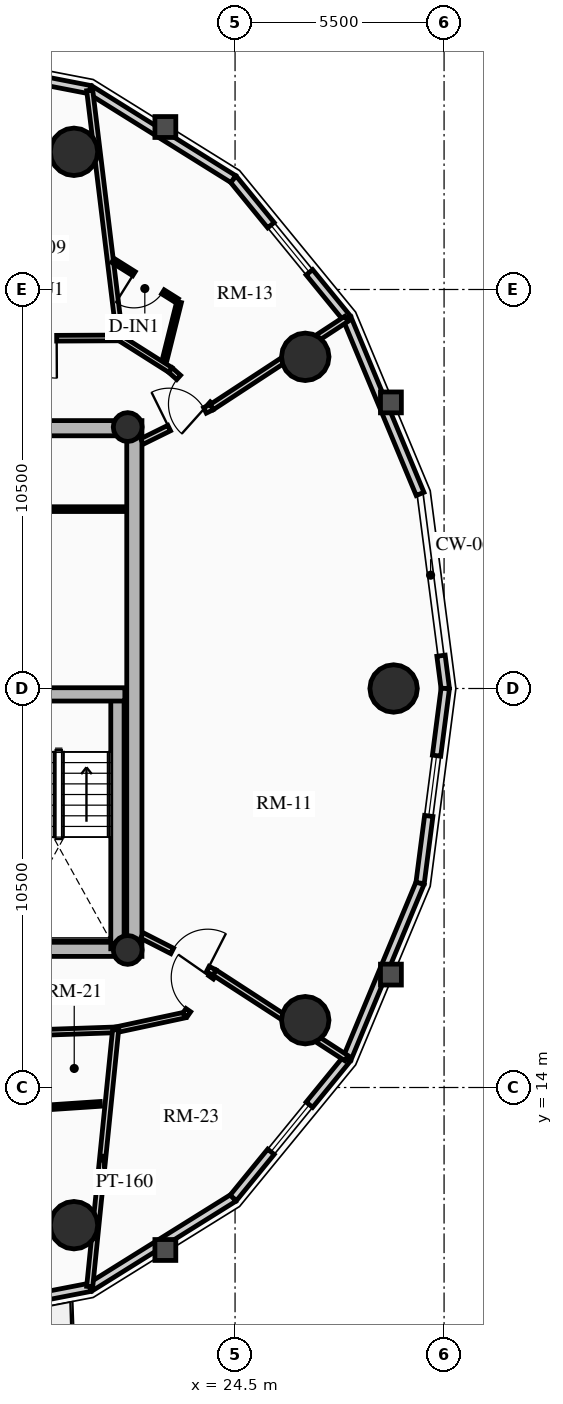
"""IFC4 building model, lengths in metres.
Left out: names, types, materials, properties, quantities, classifications, styles, units other than length and angle.
Written with IfcOpenShell. Run it as: python <this file> out.ifc"""

import sys

from ifc_helpers import new_model, si_unit, direction, frame, frame_2d, origin, origin_2d, place, context, subcontext, project, spatial, rectangle, circle, hollow_circle, extrude, source, transform, mapped, element, fill, save


model = new_model("IFC4")
c1 = context("Model", 3, precision=1e-05, world=origin(), true_north=direction((0.0, 1.0)))
c2 = subcontext(c1, "Body", "Model", "MODEL_VIEW")
j1 = project(units=[si_unit("LENGTHUNIT", "METRE"), si_unit("PLANEANGLEUNIT", "RADIAN")], contexts=[c1])
p1 = place(None, origin())
s1 = spatial("IfcSite", under=j1, at=p1, CompositionType="ELEMENT")
p2 = place(p1, origin())
s2 = spatial("IfcBuilding", under=s1, at=p2, CompositionType="ELEMENT")
p3 = place(p2, frame((0.0, 0.0, 180.7)))
s3 = spatial("IfcBuildingStorey", under=s2, at=p3, CompositionType="ELEMENT", Elevation=180.7)
p4 = place(p3, frame((21.85, 17.45, 0.0), z_axis=(0.0, 0.0, 1.0), x_axis=(0.0, 1.0, 0.0)))
e1 = element("IfcWall", 1, at=p4, inside=s3, PredefinedType="SHEAR", context=c2, shape_type="SweptSolid", body=[
    extrude(rectangle(XDim=14.1, YDim=0.4, at=frame_2d((7.05, 0.0))), origin(), (0.0, 0.0, 1.0), 2.91),
])
p5 = place(p3, frame((11.15, 17.65, 0.0), z_axis=(0.0, 0.0, 1.0), x_axis=(1.0, 0.0, 0.0)))
e2 = element("IfcWall", 2, at=p5, inside=s3, PredefinedType="SHEAR", context=c2, shape_type="SweptSolid", body=[
    extrude(rectangle(XDim=10.7, YDim=0.4, at=frame_2d((5.35, 0.0))), origin(), (0.0, 0.0, 1.0), 2.91),
])
m1 = source(origin(), c2, "Body", "SweptSolid", [
    extrude(rectangle(XDim=1.5, YDim=2.02, at=frame_2d((0.75, 1.01))), frame((0.0, 0.21, 0.0), z_axis=(0.0, -1.0, 0.0), x_axis=(1.0, 0.0, 0.0)), (0.0, 0.0, 1.0), 0.42),
])
p6 = place(p5, frame((5.45, 0.0, 0.0)))
e3 = element("IfcOpeningElement", 3, at=p6, cuts=e2, PredefinedType="OPENING", context=c2, shape_type="MappedRepresentation", body=[
    mapped(m1, transform((0.0, 0.0, 0.0), x_axis=(1.0, 0.0, 0.0), y_axis=(0.0, 1.0, 0.0), z_axis=(0.0, 0.0, 1.0), scale=1.0)),
])
p7 = place(p3, frame((11.15, 31.35, 0.0), z_axis=(0.0, 0.0, 1.0), x_axis=(1.0, 0.0, 0.0)))
e4 = element("IfcWall", 4, at=p7, inside=s3, PredefinedType="SHEAR", context=c2, shape_type="SweptSolid", body=[
    extrude(rectangle(XDim=10.7, YDim=0.4, at=frame_2d((5.35, 0.0))), origin(), (0.0, 0.0, 1.0), 2.91),
])
p8 = place(p7, frame((4.6, 0.0, 0.0)))
e5 = element("IfcOpeningElement", 5, at=p8, cuts=e4, PredefinedType="OPENING", context=c2, shape_type="MappedRepresentation", body=[
    mapped(m1, transform((0.0, 0.0, 0.0), x_axis=(1.0, 0.0, 0.0), y_axis=(0.0, 1.0, 0.0), z_axis=(0.0, 0.0, 1.0), scale=1.0)),
])
p9 = place(p3, frame((21.405, 17.65, 0.0), z_axis=(0.0, 0.0, 1.0), x_axis=(0.0, 1.0, 0.0)))
e6 = element("IfcWall", 6, at=p9, inside=s3, PredefinedType="SHEAR", context=c2, shape_type="SweptSolid", body=[
    extrude(rectangle(XDim=6.695, YDim=0.35, at=frame_2d((3.348, 0.0))), origin(), (0.0, 0.0, 1.0), 2.91),
])
p10 = place(p3, frame((18.315, 24.345, 0.0), z_axis=(0.0, 0.0, 1.0), x_axis=(1.0, 0.0, 0.0)))
e7 = element("IfcWall", 7, at=p10, inside=s3, PredefinedType="SHEAR", context=c2, shape_type="SweptSolid", body=[
    extrude(rectangle(XDim=3.285, YDim=0.35, at=frame_2d((1.643, 0.0))), origin(), (0.0, 0.0, 1.0), 2.91),
])
for number, where, z_axis, x_axis in (
    (8, (21.675, 17.62, 0.0), (0.0, 0.0, 1.0), (1.0, 0.0, 0.0)),
    (9, (21.675, 31.38, 0.0), (0.0, 0.0, 1.0), (1.0, 0.0, 0.0)),
):
    element("IfcColumn", number, at=place(p3, frame(where, z_axis=z_axis, x_axis=x_axis)), inside=s3, PredefinedType="COLUMN", context=c2, shape_type="SweptSolid", body=[
        extrude(hollow_circle(Radius=0.38, WallThickness=0.032, at=origin_2d()), origin(), (0.0, 0.0, 1.0), 2.91),
    ])
for number, where, z_axis, x_axis in (
    (10, (28.672, 24.5, 0.0), (0.0, 0.0, 1.0), (1.0, 0.0, 0.0)),
    (11, (26.347, 33.229, 0.0), (0.0, 0.0, 1.0), (1.0, 0.0, 0.0)),
    (12, (20.261, 38.623, 0.0), (0.0, 0.0, 1.0), (1.0, 0.0, 0.0)),
    (13, (20.261, 10.377, 0.0), (0.0, 0.0, 1.0), (1.0, 0.0, 0.0)),
    (14, (26.347, 15.771, 0.0), (0.0, 0.0, 1.0), (1.0, 0.0, 0.0)),
):
    element("IfcColumn", number, at=place(p3, frame(where, z_axis=z_axis, x_axis=x_axis)), inside=s3, PredefinedType="USERDEFINED", context=c2, shape_type="SweptSolid", body=[
        extrude(circle(Radius=0.625, at=origin_2d()), origin(), (0.0, 0.0, 1.0), 2.91),
    ])
p11 = place(p3, frame((29.919, 25.363, 0.0), z_axis=(0.0, 0.0, 1.0), x_axis=(0.128247365719, -0.991742211054, 0.0)))
e15 = element("IfcWall", 15, at=p11, inside=s3, PredefinedType="SOLIDWALL", context=c2, shape_type="SweptSolid", body=[
    extrude(rectangle(XDim=0.87, YDim=0.22, at=frame_2d((0.435, 0.0))), origin(), (0.0, 0.0, 1.0), 2.675),
])
p12 = place(p3, frame((27.447, 34.24, 0.0), z_axis=(0.0, 0.0, 1.0), x_axis=(0.384144094086, -0.923273152961, 0.0)))
e16 = element("IfcWall", 16, at=p12, inside=s3, PredefinedType="SOLIDWALL", context=c2, shape_type="SweptSolid", body=[
    extrude(rectangle(XDim=5.003, YDim=0.22, at=frame_2d((2.501, 0.0))), origin(), (0.0, 0.0, 1.0), 2.245),
])
p13 = place(p3, frame((24.453, 37.906, 0.0), z_axis=(0.0, 0.0, 1.0), x_axis=(0.632470615287, -0.774584353572, 0.0)))
e17 = element("IfcWall", 17, at=p13, inside=s3, PredefinedType="SOLIDWALL", context=c2, shape_type="SweptSolid", body=[
    extrude(rectangle(XDim=4.733, YDim=0.22, at=frame_2d((2.366, 0.0))), origin(), (0.0, 0.0, 1.0), 2.245),
])
m2 = source(origin(), c2, "Body", "SweptSolid", [
    extrude(rectangle(XDim=1.6, YDim=1.3, at=frame_2d((0.8, 0.65))), frame((0.0, 0.12, 0.0), z_axis=(0.0, -1.0, 0.0), x_axis=(1.0, 0.0, 0.0)), (0.0, 0.0, 1.0), 0.24),
])
p14 = place(p13, frame((1.566, 0.0, 0.65)))
e18 = element("IfcOpeningElement", 18, at=p14, cuts=e17, PredefinedType="OPENING", context=c2, shape_type="MappedRepresentation", body=[
    mapped(m2, transform((0.0, 0.0, 0.0), x_axis=(1.0, 0.0, 0.0), y_axis=(0.0, 1.0, 0.0), z_axis=(0.0, 0.0, 1.0), scale=1.0)),
])
p15 = place(p3, frame((20.681, 40.259, 0.0), z_axis=(0.0, 0.0, 1.0), x_axis=(0.848399108042, -0.529357113368, 0.0)))
e19 = element("IfcWall", 19, at=p15, inside=s3, PredefinedType="SOLIDWALL", context=c2, shape_type="SweptSolid", body=[
    extrude(rectangle(XDim=4.446, YDim=0.22, at=frame_2d((2.223, 0.0))), origin(), (0.0, 0.0, 1.0), 2.245),
])
p16 = place(p3, frame((16.5, 41.07, 0.0), z_axis=(0.0, 0.0, 1.0), x_axis=(0.981703883443, -0.190413983815, 0.0)))
e20 = element("IfcWall", 20, at=p16, inside=s3, PredefinedType="SOLIDWALL", context=c2, shape_type="SweptSolid", body=[
    extrude(rectangle(XDim=4.259, YDim=0.22, at=frame_2d((2.13, 0.0))), origin(), (0.0, 0.0, 1.0), 2.245),
])
p17 = place(p16, frame((1.33, 0.0, 0.65)))
e21 = element("IfcOpeningElement", 21, at=p17, cuts=e20, PredefinedType="OPENING", context=c2, shape_type="MappedRepresentation", body=[
    mapped(m2, transform((0.0, 0.0, 0.0), x_axis=(1.0, 0.0, 0.0), y_axis=(0.0, 1.0, 0.0), z_axis=(0.0, 0.0, 1.0), scale=1.0)),
])
p18 = place(p3, frame((20.681, 8.741, 0.0), z_axis=(0.0, 0.0, 1.0), x_axis=(-0.981703883443, -0.190413983815, 0.0)))
e22 = element("IfcWall", 22, at=p18, inside=s3, PredefinedType="SOLIDWALL", context=c2, shape_type="SweptSolid", body=[
    extrude(rectangle(XDim=4.259, YDim=0.22, at=frame_2d((2.13, 0.0))), origin(), (0.0, 0.0, 1.0), 2.245),
])
m3 = source(origin(), c2, "Body", "SweptSolid", [
    extrude(rectangle(XDim=1.15, YDim=2.005, at=frame_2d((0.575, 1.002))), frame((0.0, 0.12, 0.0), z_axis=(0.0, -1.0, 0.0), x_axis=(1.0, 0.0, 0.0)), (0.0, 0.0, 1.0), 0.24),
])
p19 = place(p18, frame((1.555, 0.0, 0.0)))
e23 = element("IfcOpeningElement", 23, at=p19, cuts=e22, PredefinedType="OPENING", context=c2, shape_type="MappedRepresentation", body=[
    mapped(m3, transform((0.0, 0.0, 0.0), x_axis=(1.0, 0.0, 0.0), y_axis=(0.0, 1.0, 0.0), z_axis=(0.0, 0.0, 1.0), scale=1.0)),
])
p20 = place(p3, frame((24.453, 11.094, 0.0), z_axis=(0.0, 0.0, 1.0), x_axis=(-0.848399108042, -0.529357113368, 0.0)))
e24 = element("IfcWall", 24, at=p20, inside=s3, PredefinedType="SOLIDWALL", context=c2, shape_type="SweptSolid", body=[
    extrude(rectangle(XDim=4.446, YDim=0.22, at=frame_2d((2.223, 0.0))), origin(), (0.0, 0.0, 1.0), 2.245),
])
p21 = place(p3, frame((27.447, 14.76, 0.0), z_axis=(0.0, 0.0, 1.0), x_axis=(-0.632470615287, -0.774584353572, 0.0)))
e25 = element("IfcWall", 25, at=p21, inside=s3, PredefinedType="SOLIDWALL", context=c2, shape_type="SweptSolid", body=[
    extrude(rectangle(XDim=4.733, YDim=0.22, at=frame_2d((2.366, 0.0))), origin(), (0.0, 0.0, 1.0), 2.245),
])
p22 = place(p21, frame((1.566, 0.0, 0.65)))
e26 = element("IfcOpeningElement", 26, at=p22, cuts=e25, PredefinedType="OPENING", context=c2, shape_type="MappedRepresentation", body=[
    mapped(m2, transform((0.0, 0.0, 0.0), x_axis=(1.0, 0.0, 0.0), y_axis=(0.0, 1.0, 0.0), z_axis=(0.0, 0.0, 1.0), scale=1.0)),
])
p23 = place(p3, frame((29.369, 19.38, 0.0), z_axis=(0.0, 0.0, 1.0), x_axis=(-0.384144094086, -0.923273152961, 0.0)))
e27 = element("IfcWall", 27, at=p23, inside=s3, PredefinedType="SOLIDWALL", context=c2, shape_type="SweptSolid", body=[
    extrude(rectangle(XDim=5.003, YDim=0.22, at=frame_2d((2.501, 0.0))), origin(), (0.0, 0.0, 1.0), 2.245),
])
p24 = place(p3, frame((30.031, 24.5, 0.0), z_axis=(0.0, 0.0, 1.0), x_axis=(-0.128287912609, -0.991736966881, 0.0)))
e28 = element("IfcWall", 28, at=p24, inside=s3, PredefinedType="SOLIDWALL", context=c2, shape_type="SweptSolid", body=[
    extrude(rectangle(XDim=5.163, YDim=0.22, at=frame_2d((2.582, 0.0))), origin(), (0.0, 0.0, 1.0), 2.245),
])
p25 = place(p24, frame((1.782, 0.0, 0.65)))
e29 = element("IfcOpeningElement", 29, at=p25, cuts=e28, PredefinedType="OPENING", context=c2, shape_type="MappedRepresentation", body=[
    mapped(m2, transform((0.0, 0.0, 0.0), x_axis=(1.0, 0.0, 0.0), y_axis=(0.0, 1.0, 0.0), z_axis=(0.0, 0.0, 1.0), scale=1.0)),
])
p26 = place(p3, frame((18.38, 29.22, 0.0), z_axis=(0.0, 0.0, 1.0), x_axis=(1.0, 0.0, 0.0)))
e30 = element("IfcWall", 30, at=p26, inside=s3, PredefinedType="PARTITIONING", context=c2, shape_type="SweptSolid", body=[
    extrude(rectangle(XDim=3.22, YDim=0.125, at=frame_2d((1.61, 0.0))), origin(), (0.0, 0.0, 1.0), 2.212),
])
p27 = place(p3, frame((23.887, 31.906, 0.0), z_axis=(0.0, 0.0, 1.0), x_axis=(-0.744900957214, 0.66717506244, 0.0)))
e31 = element("IfcWall", 31, at=p27, inside=s3, PredefinedType="PARTITIONING", context=c2, shape_type="SweptSolid", body=[
    extrude(rectangle(XDim=1.464, YDim=0.15, at=frame_2d((0.732, 0.0))), origin(), (0.0, 0.0, 1.0), 2.245),
])
m4 = source(origin(), c2, "Body", "SweptSolid", [
    extrude(rectangle(XDim=1.05, YDim=2.015, at=frame_2d((0.525, 1.007))), frame((0.0, 0.085, 0.0), z_axis=(0.0, -1.0, 0.0), x_axis=(1.0, 0.0, 0.0)), (0.0, 0.0, 1.0), 0.17),
])
p28 = place(p27, frame((0.12, 0.0, 0.0)))
e32 = element("IfcOpeningElement", 32, at=p28, cuts=e31, PredefinedType="OPENING", context=c2, shape_type="MappedRepresentation", body=[
    mapped(m4, transform((0.0, 0.0, 0.0), x_axis=(1.0, 0.0, 0.0), y_axis=(0.0, 1.0, 0.0), z_axis=(0.0, 0.0, 1.0), scale=1.0)),
])
p29 = place(p3, frame((22.797, 32.883, 0.0), z_axis=(0.0, 0.0, 1.0), x_axis=(-0.84484009232, 0.535018895375, 0.0)))
e33 = element("IfcWall", 33, at=p29, inside=s3, PredefinedType="PARTITIONING", context=c2, shape_type="SweptSolid", body=[
    extrude(rectangle(XDim=1.575, YDim=0.15, at=frame_2d((0.788, 0.0))), origin(), (0.0, 0.0, 1.0), 2.245),
])
p30 = place(p3, frame((21.466, 33.726, 0.0), z_axis=(0.0, 0.0, 1.0), x_axis=(-0.99998838579, -0.004819573058, 0.0)))
e34 = element("IfcWall", 34, at=p30, inside=s3, PredefinedType="PARTITIONING", context=c2, shape_type="SweptSolid", body=[
    extrude(rectangle(XDim=3.343, YDim=0.15, at=frame_2d((1.672, 0.0))), origin(), (0.0, 0.0, 1.0), 2.245),
])
p31 = place(p30, frame((1.66, 0.0, 0.0)))
e35 = element("IfcOpeningElement", 35, at=p31, cuts=e34, PredefinedType="OPENING", context=c2, shape_type="MappedRepresentation", body=[
    mapped(m4, transform((0.0, 0.0, 0.0), x_axis=(1.0, 0.0, 0.0), y_axis=(0.0, 1.0, 0.0), z_axis=(0.0, 0.0, 1.0), scale=1.0)),
])
p32 = place(p3, frame((14.802, 15.291, 0.0), z_axis=(0.0, 0.0, 1.0), x_axis=(0.999405778293, 0.034468686011, 0.0)))
e36 = element("IfcWall", 36, at=p32, inside=s3, PredefinedType="PARTITIONING", context=c2, shape_type="SweptSolid", body=[
    extrude(rectangle(XDim=6.559, YDim=0.15, at=frame_2d((3.279, 0.0))), origin(), (0.0, 0.0, 1.0), 2.245),
])
p33 = place(p3, frame((21.357, 15.517, 0.0), z_axis=(0.0, 0.0, 1.0), x_axis=(0.977773676035, 0.209663154733, 0.0)))
e37 = element("IfcWall", 37, at=p33, inside=s3, PredefinedType="PARTITIONING", context=c2, shape_type="SweptSolid", body=[
    extrude(rectangle(XDim=1.865, YDim=0.15, at=frame_2d((0.933, 0.0))), origin(), (0.0, 0.0, 1.0), 2.245),
])
p34 = place(p3, frame((23.181, 15.908, 0.0), z_axis=(0.0, 0.0, 1.0), x_axis=(0.571342842249, 0.820711494138, 0.0)))
e38 = element("IfcWall", 38, at=p34, inside=s3, PredefinedType="PARTITIONING", context=c2, shape_type="SweptSolid", body=[
    extrude(rectangle(XDim=1.362, YDim=0.15, at=frame_2d((0.681, 0.0))), origin(), (0.0, 0.0, 1.0), 2.245),
])
p35 = place(p34, frame((0.156, 0.0, 0.0)))
e39 = element("IfcOpeningElement", 39, at=p35, cuts=e38, PredefinedType="OPENING", context=c2, shape_type="MappedRepresentation", body=[
    mapped(m4, transform((0.0, 0.0, 0.0), x_axis=(1.0, 0.0, 0.0), y_axis=(0.0, 1.0, 0.0), z_axis=(0.0, 0.0, 1.0), scale=1.0)),
])
p36 = place(p3, frame((23.887, 31.906, 0.0), z_axis=(0.0, 0.0, 1.0), x_axis=(0.836482991446, 0.547992887748, 0.0)))
e40 = element("IfcWall", 40, at=p36, inside=s3, PredefinedType="PARTITIONING", context=c2, shape_type="SweptSolid", body=[
    extrude(rectangle(XDim=4.236, YDim=0.16, at=frame_2d((2.118, 0.0))), origin(), (0.0, 0.0, 1.0), 2.245),
])
p37 = place(p3, frame((21.466, 33.726, 0.0), z_axis=(0.0, 0.0, 1.0), x_axis=(-0.12050358126, 0.992712892484, 0.0)))
e41 = element("IfcWall", 41, at=p37, inside=s3, PredefinedType="PARTITIONING", context=c2, shape_type="SweptSolid", body=[
    extrude(rectangle(XDim=6.562, YDim=0.16, at=frame_2d((3.281, 0.0))), origin(), (0.0, 0.0, 1.0), 2.245),
])
p38 = place(p3, frame((21.357, 15.517, 0.0), z_axis=(0.0, 0.0, 1.0), x_axis=(-0.100446941693, -0.994942416376, 0.0)))
e42 = element("IfcWall", 42, at=p38, inside=s3, PredefinedType="PARTITIONING", context=c2, shape_type="SweptSolid", body=[
    extrude(rectangle(XDim=6.791, YDim=0.16, at=frame_2d((3.396, 0.0))), origin(), (0.0, 0.0, 1.0), 2.245),
])
p39 = place(p3, frame((23.959, 17.025, 0.0), z_axis=(0.0, 0.0, 1.0), x_axis=(0.838803293388, -0.544434601215, 0.0)))
e43 = element("IfcWall", 43, at=p39, inside=s3, PredefinedType="PARTITIONING", context=c2, shape_type="SweptSolid", body=[
    extrude(rectangle(XDim=4.139, YDim=0.16, at=frame_2d((2.069, 0.0))), origin(), (0.0, 0.0, 1.0), 2.245),
])
p40 = place(p3, frame((22.05, 31.0, 0.0), z_axis=(0.0, 0.0, 1.0), x_axis=(0.896798317999, 0.442439574218, 0.0)))
e44 = element("IfcWall", 44, at=p40, inside=s3, PredefinedType="PARTITIONING", context=c2, shape_type="SweptSolid", body=[
    extrude(rectangle(XDim=2.048, YDim=0.16, at=frame_2d((1.024, 0.0))), origin(), (0.0, 0.0, 1.0), 2.245),
])
m5 = source(origin(), c2, "Body", "SweptSolid", [
    extrude(rectangle(XDim=1.05, YDim=2.015, at=frame_2d((0.525, 1.007))), frame((0.0, 0.09, 0.0), z_axis=(0.0, -1.0, 0.0), x_axis=(1.0, 0.0, 0.0)), (0.0, 0.0, 1.0), 0.18),
])
p41 = place(p40, frame((0.798, 0.0, 0.0)))
e45 = element("IfcOpeningElement", 45, at=p41, cuts=e44, PredefinedType="OPENING", context=c2, shape_type="MappedRepresentation", body=[
    mapped(m5, transform((0.0, 0.0, 0.0), x_axis=(1.0, 0.0, 0.0), y_axis=(0.0, 1.0, 0.0), z_axis=(0.0, 0.0, 1.0), scale=1.0)),
])
p42 = place(p3, frame((22.05, 18.0, 0.0), z_axis=(0.0, 0.0, 1.0), x_axis=(0.890660222535, -0.454669515136, 0.0)))
e46 = element("IfcWall", 46, at=p42, inside=s3, PredefinedType="PARTITIONING", context=c2, shape_type="SweptSolid", body=[
    extrude(rectangle(XDim=2.144, YDim=0.16, at=frame_2d((1.072, 0.0))), origin(), (0.0, 0.0, 1.0), 2.245),
])
p43 = place(p42, frame((0.894, 0.0, 0.0)))
e47 = element("IfcOpeningElement", 47, at=p43, cuts=e46, PredefinedType="OPENING", context=c2, shape_type="MappedRepresentation", body=[
    mapped(m5, transform((0.0, 0.0, 0.0), x_axis=(1.0, 0.0, 0.0), y_axis=(0.0, 1.0, 0.0), z_axis=(0.0, 0.0, 1.0), scale=1.0)),
])
p44 = place(p3, frame((22.649, 33.157, 0.0), z_axis=(0.0, 0.0, 1.0), x_axis=(0.242461964074, 0.970160912415, 0.0)))
e48 = element("IfcWall", 48, at=p44, inside=s3, PredefinedType="PARTITIONING", context=c2, shape_type="SweptSolid", body=[
    extrude(rectangle(XDim=1.56, YDim=0.125, at=frame_2d((0.78, 0.0))), origin(), (0.0, 0.0, 1.0), 2.245),
])
p45 = place(p3, frame((22.975, 34.704, 0.0), z_axis=(0.0, 0.0, 1.0), x_axis=(-0.84683355027, 0.531858005615, 0.0)))
e49 = element("IfcWall", 49, at=p45, inside=s3, PredefinedType="PARTITIONING", context=c2, shape_type="SweptSolid", body=[
    extrude(rectangle(XDim=1.994, YDim=0.125, at=frame_2d((0.997, 0.0))), origin(), (0.0, 0.0, 1.0), 2.675),
])
m6 = source(origin(), c2, "Body", "SweptSolid", [
    extrude(rectangle(XDim=0.9, YDim=2.005, at=frame_2d((0.45, 1.002))), frame((0.0, 0.073, 0.0), z_axis=(0.0, -1.0, 0.0), x_axis=(1.0, 0.0, 0.0)), (0.0, 0.0, 1.0), 0.145),
])
p46 = place(p45, frame((0.44, 0.0, 0.0)))
e50 = element("IfcOpeningElement", 50, at=p46, cuts=e49, PredefinedType="OPENING", context=c2, shape_type="MappedRepresentation", body=[
    mapped(m6, transform((0.0, 0.0, 0.0), x_axis=(1.0, 0.0, 0.0), y_axis=(0.0, 1.0, 0.0), z_axis=(0.0, 0.0, 1.0), scale=1.0)),
])
p47 = place(p3, frame((18.137, 13.38, 0.0), z_axis=(0.0, 0.0, 1.0), x_axis=(0.997767152953, 0.066788535611, 0.0)))
e51 = element("IfcWall", 51, at=p47, inside=s3, PredefinedType="PARTITIONING", context=c2, shape_type="SweptSolid", body=[
    extrude(rectangle(XDim=2.826, YDim=0.125, at=frame_2d((1.413, 0.0))), origin(), (0.0, 0.0, 1.0), 2.245),
])
p48 = place(p47, frame((0.12, 0.0, 0.0)))
e52 = element("IfcOpeningElement", 52, at=p48, cuts=e51, PredefinedType="OPENING", context=c2, shape_type="MappedRepresentation", body=[
    mapped(m6, transform((0.0, 0.0, 0.0), x_axis=(1.0, 0.0, 0.0), y_axis=(0.0, 1.0, 0.0), z_axis=(0.0, 0.0, 1.0), scale=1.0)),
])
m7 = source(origin(), c2, "Body", "SweptSolid", [
    extrude(rectangle(XDim=1.6, YDim=1.3, at=frame_2d((0.8, 0.65))), frame((0.0, 0.03, 0.0), z_axis=(0.0, -1.0, 0.0), x_axis=(1.0, 0.0, 0.0)), (0.0, 0.0, 1.0), 0.06),
])
p49 = place(p14, origin())
e53 = element("IfcWindow", 53, at=p49, inside=s3, PartitioningType="SINGLE_PANEL", PredefinedType="WINDOW", context=c2, shape_type="MappedRepresentation", body=[
    mapped(m7, transform((0.0, 0.0, 0.0), x_axis=(1.0, 0.0, 0.0), y_axis=(0.0, 1.0, 0.0), z_axis=(0.0, 0.0, 1.0), scale=1.0)),
])
fill(e18, e53)
p50 = place(p22, origin())
e54 = element("IfcWindow", 54, at=p50, inside=s3, PartitioningType="SINGLE_PANEL", PredefinedType="WINDOW", context=c2, shape_type="MappedRepresentation", body=[
    mapped(m7, transform((0.0, 0.0, 0.0), x_axis=(1.0, 0.0, 0.0), y_axis=(0.0, 1.0, 0.0), z_axis=(0.0, 0.0, 1.0), scale=1.0)),
])
fill(e26, e54)
p51 = place(p25, origin())
e55 = element("IfcWindow", 55, at=p51, inside=s3, PartitioningType="SINGLE_PANEL", PredefinedType="WINDOW", context=c2, shape_type="MappedRepresentation", body=[
    mapped(m7, transform((0.0, 0.0, 0.0), x_axis=(1.0, 0.0, 0.0), y_axis=(0.0, 1.0, 0.0), z_axis=(0.0, 0.0, 1.0), scale=1.0)),
])
fill(e29, e55)
m8 = source(origin(), c2, "Body", "SweptSolid", [
    extrude(rectangle(XDim=1.05, YDim=2.015, at=frame_2d((0.525, 1.007))), frame((0.0, 0.025, 0.0), z_axis=(0.0, -1.0, 0.0), x_axis=(1.0, 0.0, 0.0)), (0.0, 0.0, 1.0), 0.05),
])
p52 = place(p41, origin())
e56 = element("IfcDoor", 56, at=p52, inside=s3, OperationType="SINGLE_SWING_LEFT", PredefinedType="DOOR", context=c2, shape_type="MappedRepresentation", body=[
    mapped(m8, transform((0.0, 0.0, 0.0), x_axis=(1.0, 0.0, 0.0), y_axis=(0.0, 1.0, 0.0), z_axis=(0.0, 0.0, 1.0), scale=1.0)),
])
fill(e45, e56)
p53 = place(p43, origin())
e57 = element("IfcDoor", 57, at=p53, inside=s3, OperationType="SINGLE_SWING_RIGHT", PredefinedType="DOOR", context=c2, shape_type="MappedRepresentation", body=[
    mapped(m8, transform((0.0, 0.0, 0.0), x_axis=(1.0, 0.0, 0.0), y_axis=(0.0, 1.0, 0.0), z_axis=(0.0, 0.0, 1.0), scale=1.0)),
])
fill(e47, e57)
p54 = place(p28, origin())
e58 = element("IfcDoor", 58, at=p54, inside=s3, OperationType="SINGLE_SWING_LEFT", PredefinedType="DOOR", context=c2, shape_type="MappedRepresentation", body=[
    mapped(m8, transform((0.0, 0.0, 0.0), x_axis=(1.0, 0.0, 0.0), y_axis=(0.0, 1.0, 0.0), z_axis=(0.0, 0.0, 1.0), scale=1.0)),
])
fill(e32, e58)
m9 = source(origin(), c2, "Body", "SweptSolid", [
    extrude(rectangle(XDim=0.9, YDim=2.005, at=frame_2d((0.45, 1.002))), frame((0.0, 0.025, 0.0), z_axis=(0.0, -1.0, 0.0), x_axis=(1.0, 0.0, 0.0)), (0.0, 0.0, 1.0), 0.05),
])
p55 = place(p46, origin())
e59 = element("IfcDoor", 59, at=p55, inside=s3, OperationType="SINGLE_SWING_RIGHT", PredefinedType="DOOR", context=c2, shape_type="MappedRepresentation", body=[
    mapped(m9, transform((0.0, 0.0, 0.0), x_axis=(1.0, 0.0, 0.0), y_axis=(0.0, 1.0, 0.0), z_axis=(0.0, 0.0, 1.0), scale=1.0)),
])
fill(e50, e59)
p56 = place(p31, origin())
e60 = element("IfcDoor", 60, at=p56, inside=s3, OperationType="SINGLE_SWING_LEFT", PredefinedType="DOOR", context=c2, shape_type="MappedRepresentation", body=[
    mapped(m8, transform((0.0, 0.0, 0.0), x_axis=(1.0, 0.0, 0.0), y_axis=(0.0, 1.0, 0.0), z_axis=(0.0, 0.0, 1.0), scale=1.0)),
])
fill(e35, e60)
p57 = place(p35, origin())
e61 = element("IfcDoor", 61, at=p57, inside=s3, OperationType="SINGLE_SWING_RIGHT", PredefinedType="DOOR", context=c2, shape_type="MappedRepresentation", body=[
    mapped(m8, transform((0.0, 0.0, 0.0), x_axis=(1.0, 0.0, 0.0), y_axis=(0.0, 1.0, 0.0), z_axis=(0.0, 0.0, 1.0), scale=1.0)),
])
fill(e39, e61)
save(model, sys.argv[1])
